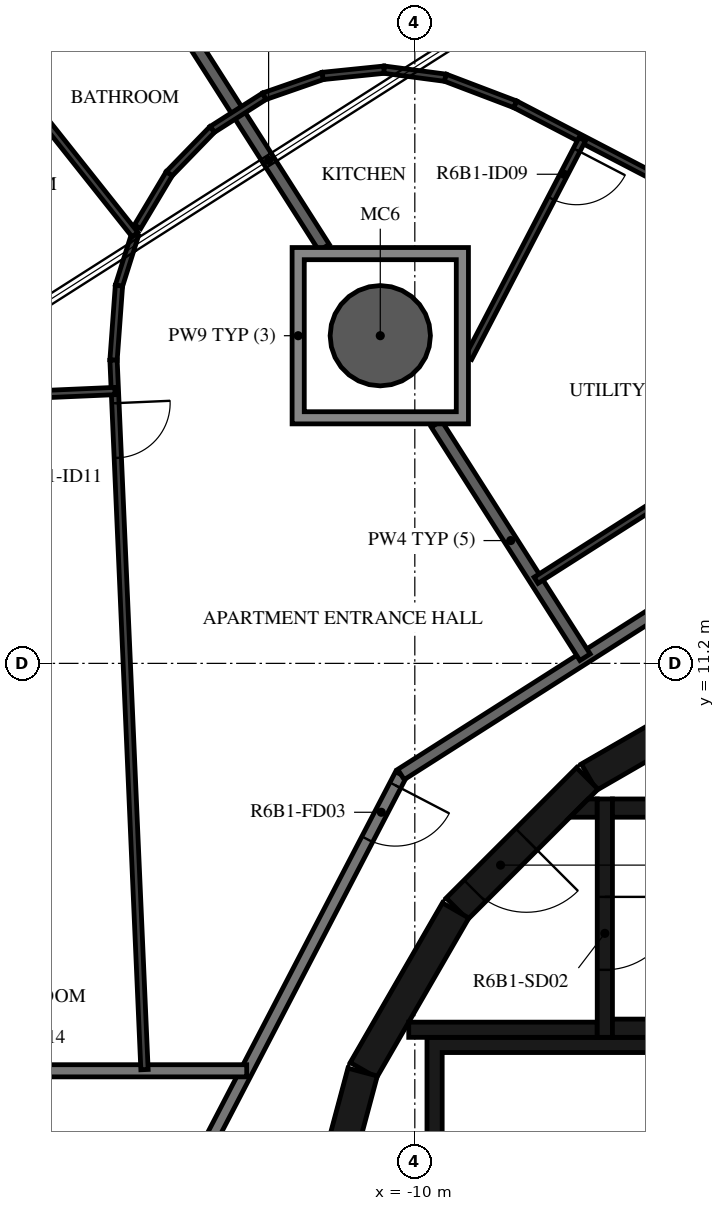
"""IFC4 building model, lengths in metres.
Left out: names, types, materials, properties, quantities, classifications, styles, units other than length and angle.
Written with IfcOpenShell. Run it as: python <this file> out.ifc"""

import sys

from ifc_helpers import new_model, si_unit, direction, frame, frame_2d, origin, origin_2d, place, context, subcontext, project, spatial, polyline, rectangle, hollow_circle, outline, extrude, element, fill, save


model = new_model("IFC4")
c1 = context("Model", 3, precision=1e-05, world=origin(), true_north=direction((0.0, 1.0)))
c2 = subcontext(c1, "Body", "Model", "MODEL_VIEW")
j1 = project(units=[si_unit("LENGTHUNIT", "METRE"), si_unit("PLANEANGLEUNIT", "RADIAN")], contexts=[c1])
p1 = place(None, origin())
s1 = spatial("IfcSite", under=j1, at=p1, CompositionType="ELEMENT")
p2 = place(p1, origin())
s2 = spatial("IfcBuilding", under=s1, at=p2, CompositionType="ELEMENT")
p3 = place(p2, frame((0.0, 0.0, 237.2)))
s3 = spatial("IfcBuildingStorey", under=s2, at=p3, CompositionType="ELEMENT", Elevation=237.2)
p4 = place(p3, frame((-10.568, 16.588, -0.38), z_axis=(0.0, 0.0, 1.0), x_axis=(1.0, 0.0, 0.0)))
e1 = element("IfcColumn", 1, at=p4, inside=s3, PredefinedType="COLUMN", context=c2, shape_type="SweptSolid", body=[
    extrude(hollow_circle(Radius=0.825, WallThickness=0.04, at=origin_2d()), origin(), (0.0, 0.0, 1.0), 3.5),
])
p5 = place(p3, frame((-4.51, 10.845, 0.0), z_axis=(0.0, 0.0, 1.0), x_axis=(-0.865975092491, -0.500087131594, 0.0)))
e2 = element("IfcWall", 2, at=p5, inside=s3, PredefinedType="SHEAR", context=c2, shape_type="SweptSolid", body=[
    extrude(rectangle(XDim=3.033, YDim=0.5, at=frame_2d((1.516, 0.0))), origin(), (0.0, 0.0, 1.0), 3.12),
])
p6 = place(p3, frame((-7.164, 9.308, 0.0), z_axis=(0.0, 0.0, 1.0), x_axis=(-0.707106781187, -0.707106781187, 0.0)))
e3 = element("IfcWall", 3, at=p6, inside=s3, PredefinedType="SHEAR", context=c2, shape_type="SweptSolid", body=[
    extrude(rectangle(XDim=3.032, YDim=0.5, at=frame_2d((1.516, 0.0))), origin(), (0.0, 0.0, 1.0), 3.12),
])
p7 = place(p6, frame((1.416, 0.0, 0.0)))
e4 = element("IfcOpeningElement", 4, at=p7, cuts=e3, PredefinedType="OPENING", context=c2, shape_type="SweptSolid", body=[
    extrude(rectangle(XDim=1.2, YDim=2.1, at=frame_2d((0.6, 1.05))), frame((0.0, 0.26, 0.0), z_axis=(0.0, -1.0, 0.0), x_axis=(1.0, 0.0, 0.0)), (0.0, 0.0, 1.0), 0.52),
])
for number, where, z_axis, x_axis in (
    (5, (-9.329, 7.137, 0.0), (0.0, 0.0, 1.0), (-0.5, -0.866, 0.0)),
    (6, (-10.858, 4.479, 0.0), (0.0, 0.0, 1.0), (-0.259, -0.966, 0.0)),
):
    element("IfcWall", number, at=place(p3, frame(where, z_axis=z_axis, x_axis=x_axis)), inside=s3, PredefinedType="SHEAR", context=c2, shape_type="SweptSolid", body=[
        extrude(rectangle(XDim=3.033, YDim=0.5, at=frame_2d((1.516, 0.0))), origin(), (0.0, 0.0, 1.0), 3.12),
    ])
for number, where, z_axis, x_axis in (
    (7, (-6.75, 5.2, 0.0), (0.0, 0.0, 1.0), (1.0, 0.0, 0.0)),
    (8, (-6.75, 8.82, 0.0), (0.0, 0.0, 1.0), (1.0, 0.0, 0.0)),
):
    element("IfcWall", number, at=place(p3, frame(where, z_axis=z_axis, x_axis=x_axis)), inside=s3, PredefinedType="SHEAR", context=c2, shape_type="SweptSolid", body=[
        extrude(rectangle(XDim=6.75, YDim=0.3, at=frame_2d((3.375, 0.0))), origin(), (0.0, 0.0, 1.0), 3.12),
    ])
p8 = place(p3, frame((-6.875, 8.97, 0.0), z_axis=(0.0, 0.0, 1.0), x_axis=(0.0, -1.0, 0.0)))
e9 = element("IfcWall", 9, at=p8, inside=s3, PredefinedType="SHEAR", context=c2, shape_type="SweptSolid", body=[
    extrude(rectangle(XDim=3.92, YDim=0.25, at=frame_2d((1.96, 0.0))), origin(), (0.0, 0.0, 1.0), 3.12),
])
p9 = place(p8, frame((1.61, 0.0, 0.0)))
e10 = element("IfcOpeningElement", 10, at=p9, cuts=e9, PredefinedType="OPENING", context=c2, shape_type="SweptSolid", body=[
    extrude(rectangle(XDim=1.2, YDim=2.1, at=frame_2d((0.6, 1.05))), frame((0.0, 0.135, 0.0), z_axis=(0.0, -1.0, 0.0), x_axis=(1.0, 0.0, 0.0)), (0.0, 0.0, 1.0), 0.27),
])
p10 = place(p3, frame((-7.0, 5.175, 0.0), z_axis=(0.0, 0.0, 1.0), x_axis=(-1.0, 0.0, 0.0)))
e11 = element("IfcWall", 11, at=p10, inside=s3, PredefinedType="SHEAR", context=c2, shape_type="SweptSolid", body=[
    extrude(rectangle(XDim=3.1, YDim=0.25, at=frame_2d((1.55, 0.0))), origin(), (0.0, 0.0, 1.0), 3.12),
])
p11 = place(p3, origin())
e12 = element("IfcWall", 12, at=p11, inside=s3, PredefinedType="SHEAR", context=c2, shape_type="SweptSolid", body=[
    extrude(outline(polyline([(-7.148, 8.97), (-7.0, 8.97), (-7.0, 8.67), (-7.448, 8.67), (-7.148, 8.97)])), origin(), (0.0, 0.0, 1.0), 3.12),
])
p12 = place(p3, origin())
e13 = element("IfcWall", 13, at=p12, inside=s3, PredefinedType="SHEAR", context=c2, shape_type="SweptSolid", body=[
    extrude(outline(polyline([(-9.55, 4.8), (-5.5, 4.8), (-5.5, 1.9), (-5.25, 1.9), (-5.25, 4.8), (-1.2, 4.8), (-1.2, 1.9), (-0.95, 1.9), (-0.95, 4.8), (0.95, 4.8), (0.95, 1.9), (1.2, 1.9), (1.2, 4.8), (3.1, 4.8), (3.1, 1.9), (3.35, 1.9), (3.35, 4.8), (5.25, 4.8), (5.25, 1.9), (5.5, 1.9), (5.5, 4.8), (7.4, 4.8), (7.4, 1.9), (7.65, 1.9), (7.65, 4.8), (9.55, 4.8), (9.55, 1.9), (9.8, 1.9), (9.8, 4.8), (9.8, 5.05), (-9.8, 5.05), (-9.8, 4.8), (-9.8, 1.9), (-9.55, 1.9), (-9.55, 4.8)])), origin(), (0.0, 0.0, 1.0), 3.12),
])
p13 = place(p3, frame((-10.228, 9.372, 0.0), z_axis=(0.0, 0.0, 1.0), x_axis=(-0.461759464021, -0.887005184532, 0.0)))
e14 = element("IfcWall", 14, at=p13, inside=s3, PredefinedType="STANDARD", context=c2, shape_type="SweptSolid", body=[
    extrude(rectangle(XDim=7.181, YDim=0.2, at=frame_2d((3.591, 0.0))), origin(), (0.0, 0.0, 1.0), 3.12),
])
p14 = place(p13, frame((0.2, 0.0, 0.0)))
e15 = element("IfcOpeningElement", 15, at=p14, cuts=e14, PredefinedType="OPENING", context=c2, shape_type="SweptSolid", body=[
    extrude(rectangle(XDim=1.0, YDim=2.1, at=frame_2d((0.5, 1.05))), frame((0.0, 0.11, 0.0), z_axis=(0.0, -1.0, 0.0), x_axis=(1.0, 0.0, 0.0)), (0.0, 0.0, 1.0), 0.22),
])
p15 = place(p3, frame((-4.172, 13.231, 0.0), z_axis=(0.0, 0.0, 1.0), x_axis=(-0.843388394728, -0.537304397561, 0.0)))
e16 = element("IfcWall", 16, at=p15, inside=s3, PredefinedType="STANDARD", context=c2, shape_type="SweptSolid", body=[
    extrude(rectangle(XDim=7.181, YDim=0.2, at=frame_2d((3.59, 0.0))), origin(), (0.0, 0.0, 1.0), 3.12),
])
p16 = place(p3, frame((-12.764, 4.5, 0.0), z_axis=(0.0, 0.0, 1.0), x_axis=(-1.0, 0.0, 0.0)))
e17 = element("IfcWall", 17, at=p16, inside=s3, PredefinedType="STANDARD", context=c2, shape_type="SweptSolid", body=[
    extrude(rectangle(XDim=4.086, YDim=0.2, at=frame_2d((2.043, 0.0))), origin(), (0.0, 0.0, 1.0), 3.12),
])
p17 = place(p3, frame((-9.645, 15.138, 0.0), z_axis=(0.0, 0.0, 1.0), x_axis=(0.537267800866, -0.84341170857, 0.0)))
e18 = element("IfcWall", 18, at=p17, inside=s3, PredefinedType="STANDARD", context=c2, shape_type="SweptSolid", body=[
    extrude(rectangle(XDim=4.55, YDim=0.2, at=frame_2d((2.275, 0.0))), origin(), (0.0, 0.0, 1.0), 3.12),
])
p18 = place(p3, frame((-14.837, 23.29, 0.0), z_axis=(0.0, 0.0, 1.0), x_axis=(0.537316863221, -0.843380452998, 0.0)))
e19 = element("IfcWall", 19, at=p18, inside=s3, PredefinedType="STANDARD", context=c2, shape_type="SweptSolid", body=[
    extrude(rectangle(XDim=6.227, YDim=0.2, at=frame_2d((3.113, 0.0))), origin(), (0.0, 0.0, 1.0), 3.12),
])
p19 = place(p3, frame((-4.639, 14.712, 0.0), z_axis=(0.0, 0.0, 1.0), x_axis=(-0.843376843237, -0.537322529113, 0.0)))
e20 = element("IfcWall", 20, at=p19, inside=s3, PredefinedType="PARTITIONING", context=c2, shape_type="SweptSolid", body=[
    extrude(rectangle(XDim=3.992, YDim=0.12, at=frame_2d((1.996, 0.0))), origin(), (0.0, 0.0, 1.0), 3.12),
])
p20 = place(p19, frame((0.2, 0.0, 0.0)))
e21 = element("IfcOpeningElement", 21, at=p20, cuts=e20, PredefinedType="OPENING", context=c2, shape_type="SweptSolid", body=[
    extrude(rectangle(XDim=0.9, YDim=2.1, at=frame_2d((0.45, 1.05))), frame((0.0, 0.07, 0.0), z_axis=(0.0, -1.0, 0.0), x_axis=(1.0, 0.0, 0.0)), (0.0, 0.0, 1.0), 0.14),
])
p21 = place(p3, frame((-8.35, 20.394, 0.0), z_axis=(0.0, 0.0, 1.0), x_axis=(0.887020940825, -0.461729196107, 0.0)))
e22 = element("IfcWall", 22, at=p21, inside=s3, PredefinedType="PARTITIONING", context=c2, shape_type="SweptSolid", body=[
    extrude(rectangle(XDim=11.678, YDim=0.12, at=frame_2d((5.839, 0.0))), origin(), (0.0, 0.0, 1.0), 3.12),
])
p22 = place(p21, frame((3.469, 0.0, 0.0)))
e23 = element("IfcOpeningElement", 23, at=p22, cuts=e22, PredefinedType="OPENING", context=c2, shape_type="SweptSolid", body=[
    extrude(rectangle(XDim=0.9, YDim=2.1, at=frame_2d((0.45, 1.05))), frame((0.0, 0.07, 0.0), z_axis=(0.0, -1.0, 0.0), x_axis=(1.0, 0.0, 0.0)), (0.0, 0.0, 1.0), 0.14),
])
p23 = place(p3, frame((-6.237, 23.353, 0.0), z_axis=(0.0, 0.0, 1.0), x_axis=(0.181909323114, -0.983315309636, 0.0)))
e24 = element("IfcWall", 24, at=p23, inside=s3, PredefinedType="PARTITIONING", context=c2, shape_type="SweptSolid", body=[
    extrude(rectangle(XDim=4.567, YDim=0.12, at=frame_2d((2.284, 0.0))), origin(), (0.0, 0.0, 1.0), 3.12),
])
p24 = place(p23, frame((0.6, 0.0, 0.0)))
e25 = element("IfcOpeningElement", 25, at=p24, cuts=e24, PredefinedType="OPENING", context=c2, shape_type="SweptSolid", body=[
    extrude(rectangle(XDim=0.9, YDim=2.1, at=frame_2d((0.45, 1.05))), frame((0.0, 0.07, 0.0), z_axis=(0.0, -1.0, 0.0), x_axis=(1.0, 0.0, 0.0)), (0.0, 0.0, 1.0), 0.14),
])
p25 = place(p3, frame((-7.247, 19.82, 0.0), z_axis=(0.0, 0.0, 1.0), x_axis=(-0.461733980956, -0.887018450107, 0.0)))
e26 = element("IfcWall", 26, at=p25, inside=s3, PredefinedType="PARTITIONING", context=c2, shape_type="SweptSolid", body=[
    extrude(rectangle(XDim=4.052, YDim=0.12, at=frame_2d((2.026, 0.0))), origin(), (0.0, 0.0, 1.0), 3.12),
])
p26 = place(p25, frame((0.2, 0.0, 0.0)))
e27 = element("IfcOpeningElement", 27, at=p26, cuts=e26, PredefinedType="OPENING", context=c2, shape_type="SweptSolid", body=[
    extrude(rectangle(XDim=0.9, YDim=2.1, at=frame_2d((0.45, 1.05))), frame((0.0, 0.07, 0.0), z_axis=(0.0, -1.0, 0.0), x_axis=(1.0, 0.0, 0.0)), (0.0, 0.0, 1.0), 0.14),
])
for number, where, z_axis, x_axis in (
    (28, (-13.332, 19.981, 0.0), (0.0, 0.0, 1.0), (0.843, 0.537, 0.0)),
    (29, (-12.475, 20.527, 0.0), (0.0, 0.0, 1.0), (0.945, 0.328, 0.0)),
):
    element("IfcWall", number, at=place(p3, frame(where, z_axis=z_axis, x_axis=x_axis)), inside=s3, PredefinedType="PARTITIONING", context=c2, shape_type="SweptSolid", body=[
        extrude(rectangle(XDim=1.016, YDim=0.12, at=frame_2d((0.508, 0.0))), origin(), (0.0, 0.0, 1.0), 3.12),
    ])
p27 = place(p3, frame((-11.515, 20.86, 0.0), z_axis=(0.0, 0.0, 1.0), x_axis=(0.994818278641, 0.101669034034, 0.0)))
e30 = element("IfcWall", 30, at=p27, inside=s3, PredefinedType="PARTITIONING", context=c2, shape_type="SweptSolid", body=[
    extrude(rectangle(XDim=1.016, YDim=0.12, at=frame_2d((0.508, 0.0))), origin(), (0.0, 0.0, 1.0), 3.12),
])
p28 = place(p3, frame((-10.504, 20.963, 0.0), z_axis=(0.0, 0.0, 1.0), x_axis=(0.991451023706, -0.13047937612, 0.0)))
e31 = element("IfcWall", 31, at=p28, inside=s3, PredefinedType="PARTITIONING", context=c2, shape_type="SweptSolid", body=[
    extrude(rectangle(XDim=1.016, YDim=0.12, at=frame_2d((0.508, 0.0))), origin(), (0.0, 0.0, 1.0), 3.12),
])
p29 = place(p3, frame((-9.497, 20.831, 0.0), z_axis=(0.0, 0.0, 1.0), x_axis=(0.934575963521, -0.355763641213, 0.0)))
e32 = element("IfcWall", 32, at=p29, inside=s3, PredefinedType="PARTITIONING", context=c2, shape_type="SweptSolid", body=[
    extrude(rectangle(XDim=1.227, YDim=0.12, at=frame_2d((0.614, 0.0))), origin(), (0.0, 0.0, 1.0), 3.12),
])
for number, where, z_axis, x_axis in (
    (33, (-13.332, 19.981, 0.0), (0.0, 0.0, 1.0), (-0.697, -0.717, 0.0)),
    (34, (-14.039, 19.252, 0.0), (0.0, 0.0, 1.0), (-0.513, -0.859, 0.0)),
):
    element("IfcWall", number, at=place(p3, frame(where, z_axis=z_axis, x_axis=x_axis)), inside=s3, PredefinedType="PARTITIONING", context=c2, shape_type="SweptSolid", body=[
        extrude(rectangle(XDim=1.016, YDim=0.12, at=frame_2d((0.508, 0.0))), origin(), (0.0, 0.0, 1.0), 3.12),
    ])
p30 = place(p3, frame((-14.601, 18.25, 0.0), z_axis=(0.0, 0.0, 1.0), x_axis=(-0.300706496876, -0.953716730867, 0.0)))
e35 = element("IfcWall", 35, at=p30, inside=s3, PredefinedType="PARTITIONING", context=c2, shape_type="SweptSolid", body=[
    extrude(rectangle(XDim=0.88, YDim=0.12, at=frame_2d((0.44, 0.0))), origin(), (0.0, 0.0, 1.0), 3.12),
])
p31 = place(p3, frame((-14.865, 17.411, 0.0), z_axis=(0.0, 0.0, 1.0), x_axis=(-0.072618457011, -0.997359794508, 0.0)))
e36 = element("IfcWall", 36, at=p31, inside=s3, PredefinedType="PARTITIONING", context=c2, shape_type="SweptSolid", body=[
    extrude(rectangle(XDim=1.227, YDim=0.12, at=frame_2d((0.614, 0.0))), origin(), (0.0, 0.0, 1.0), 3.12),
])
p32 = place(p3, frame((-14.955, 16.187, 0.0), z_axis=(0.0, 0.0, 1.0), x_axis=(0.04360777668, -0.999048728448, 0.0)))
e37 = element("IfcWall", 37, at=p32, inside=s3, PredefinedType="PARTITIONING", context=c2, shape_type="SweptSolid", body=[
    extrude(rectangle(XDim=11.679, YDim=0.12, at=frame_2d((5.839, 0.0))), origin(), (0.0, 0.0, 1.0), 3.12),
])
p33 = place(p32, frame((0.709, 0.0, 0.0)))
e38 = element("IfcOpeningElement", 38, at=p33, cuts=e37, PredefinedType="OPENING", context=c2, shape_type="SweptSolid", body=[
    extrude(rectangle(XDim=0.9, YDim=2.1, at=frame_2d((0.45, 1.05))), frame((0.0, 0.07, 0.0), z_axis=(0.0, -1.0, 0.0), x_axis=(1.0, 0.0, 0.0)), (0.0, 0.0, 1.0), 0.14),
])
p34 = place(p3, frame((-17.015, 21.29, 0.0), z_axis=(0.0, 0.0, 1.0), x_axis=(0.621976289729, -0.783036075168, 0.0)))
e39 = element("IfcWall", 39, at=p34, inside=s3, PredefinedType="PARTITIONING", context=c2, shape_type="SweptSolid", body=[
    extrude(rectangle(XDim=3.882, YDim=0.12, at=frame_2d((1.941, 0.0))), origin(), (0.0, 0.0, 1.0), 3.12),
])
p35 = place(p34, frame((0.2, 0.0, 0.0)))
e40 = element("IfcOpeningElement", 40, at=p35, cuts=e39, PredefinedType="OPENING", context=c2, shape_type="SweptSolid", body=[
    extrude(rectangle(XDim=0.8, YDim=2.1, at=frame_2d((0.4, 1.05))), frame((0.0, 0.07, 0.0), z_axis=(0.0, -1.0, 0.0), x_axis=(1.0, 0.0, 0.0)), (0.0, 0.0, 1.0), 0.14),
])
p36 = place(p3, frame((-18.529, 15.522, 0.0), z_axis=(0.0, 0.0, 1.0), x_axis=(0.999048722018, 0.043607923987, 0.0)))
e41 = element("IfcWall", 41, at=p36, inside=s3, PredefinedType="PARTITIONING", context=c2, shape_type="SweptSolid", body=[
    extrude(rectangle(XDim=3.6, YDim=0.12, at=frame_2d((1.8, 0.0))), origin(), (0.0, 0.0, 1.0), 2.73),
])
p37 = place(p36, frame((0.2, 0.0, 0.0)))
e42 = element("IfcOpeningElement", 42, at=p37, cuts=e41, PredefinedType="OPENING", context=c2, shape_type="SweptSolid", body=[
    extrude(rectangle(XDim=0.9, YDim=2.1, at=frame_2d((0.45, 1.05))), frame((0.0, 0.07, 0.0), z_axis=(0.0, -1.0, 0.0), x_axis=(1.0, 0.0, 0.0)), (0.0, 0.0, 1.0), 0.14),
])
p38 = place(p3, origin())
e43 = element("IfcWall", 43, at=p38, inside=s3, PredefinedType="STANDARD", context=c2, shape_type="SweptSolid", body=[
    extrude(outline(polyline([(-9.118, 18.038), (-9.118, 15.138), (-12.018, 15.138), (-12.018, 18.038), (-9.118, 18.038)]), holes=[polyline([(-11.818, 15.338), (-9.318, 15.338), (-9.318, 17.838), (-11.818, 17.838), (-11.818, 15.338)])]), origin(), (0.0, 0.0, 1.0), 3.12),
])
p39 = place(p9, origin())
e44 = element("IfcDoor", 44, at=p39, inside=s3, OperationType="SINGLE_SWING_LEFT", PredefinedType="DOOR", context=c2, shape_type="SweptSolid", body=[
    extrude(rectangle(XDim=1.2, YDim=2.1, at=frame_2d((0.6, 1.05))), frame((0.0, 0.025, 0.0), z_axis=(0.0, -1.0, 0.0), x_axis=(1.0, 0.0, 0.0)), (0.0, 0.0, 1.0), 0.05),
])
fill(e10, e44)
p40 = place(p7, origin())
e45 = element("IfcDoor", 45, at=p40, inside=s3, OperationType="SINGLE_SWING_RIGHT", PredefinedType="DOOR", context=c2, shape_type="SweptSolid", body=[
    extrude(rectangle(XDim=1.2, YDim=2.1, at=frame_2d((0.6, 1.05))), frame((0.0, 0.025, 0.0), z_axis=(0.0, -1.0, 0.0), x_axis=(1.0, 0.0, 0.0)), (0.0, 0.0, 1.0), 0.05),
])
fill(e4, e45)
p41 = place(p26, origin())
e46 = element("IfcDoor", 46, at=p41, inside=s3, OperationType="SINGLE_SWING_RIGHT", PredefinedType="DOOR", context=c2, shape_type="SweptSolid", body=[
    extrude(rectangle(XDim=0.9, YDim=2.1, at=frame_2d((0.45, 1.05))), frame((0.0, 0.025, 0.0), z_axis=(0.0, -1.0, 0.0), x_axis=(1.0, 0.0, 0.0)), (0.0, 0.0, 1.0), 0.05),
])
fill(e27, e46)
p42 = place(p14, origin())
e47 = element("IfcDoor", 47, at=p42, inside=s3, OperationType="SINGLE_SWING_LEFT", PredefinedType="DOOR", context=c2, shape_type="SweptSolid", body=[
    extrude(rectangle(XDim=1.0, YDim=2.1, at=frame_2d((0.5, 1.05))), frame((0.0, 0.025, 0.0), z_axis=(0.0, -1.0, 0.0), x_axis=(1.0, 0.0, 0.0)), (0.0, 0.0, 1.0), 0.05),
])
fill(e15, e47)
p43 = place(p33, origin())
e48 = element("IfcDoor", 48, at=p43, inside=s3, OperationType="SINGLE_SWING_LEFT", PredefinedType="DOOR", context=c2, shape_type="SweptSolid", body=[
    extrude(rectangle(XDim=0.9, YDim=2.1, at=frame_2d((0.45, 1.05))), frame((0.0, 0.025, 0.0), z_axis=(0.0, -1.0, 0.0), x_axis=(1.0, 0.0, 0.0)), (0.0, 0.0, 1.0), 0.05),
])
fill(e38, e48)
save(model, sys.argv[1])
